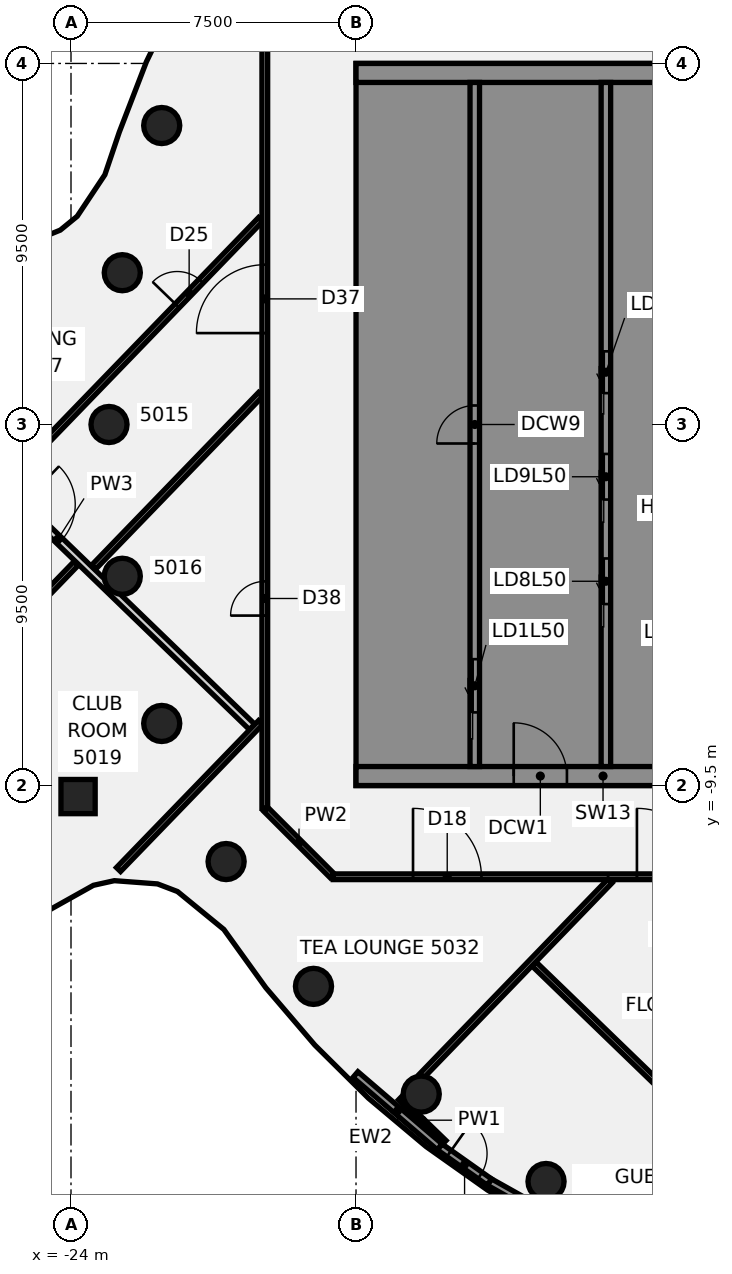
"""IFC4 building model, lengths in metres.
Left out: names, types, materials, properties, quantities, classifications, styles, units other than length and angle.
Written with IfcOpenShell. Run it as: python <this file> out.ifc"""

import sys

from ifc_helpers import new_model, si_unit, direction, frame, frame_2d, origin, origin_2d, place, context, subcontext, project, spatial, polyline, rectangle, circle, outline, extrude, element, fill, save


model = new_model("IFC4")
c1 = context("Model", 3, precision=1e-05, world=origin(), true_north=direction((0.0, 1.0)))
c2 = subcontext(c1, "Body", "Model", "MODEL_VIEW")
j1 = project(units=[si_unit("LENGTHUNIT", "METRE"), si_unit("PLANEANGLEUNIT", "RADIAN")], contexts=[c1])
p1 = place(None, origin())
s1 = spatial("IfcSite", under=j1, at=p1, CompositionType="ELEMENT")
p2 = place(p1, origin())
s2 = spatial("IfcBuilding", under=s1, at=p2, CompositionType="ELEMENT")
p3 = place(p2, frame((0.0, 0.0, 200.5)))
s3 = spatial("IfcBuildingStorey", under=s2, at=p3, CompositionType="ELEMENT", Elevation=200.5)
for number, where, z_axis, x_axis in (
    (1, (-21.613, 7.866, -0.14), (0.0, 0.0, 1.0), (1.0, 0.0, 0.0)),
    (2, (-22.651, 3.994, -0.14), (0.0, 0.0, 1.0), (1.0, 0.0, 0.0)),
    (3, (-23.0, 0.0, -0.14), (0.0, 0.0, 1.0), (1.0, 0.0, 0.0)),
    (4, (-22.651, -3.994, -0.14), (0.0, 0.0, 1.0), (1.0, 0.0, 0.0)),
    (5, (-21.613, -7.866, -0.14), (0.0, 0.0, 1.0), (1.0, 0.0, 0.0)),
    (6, (-19.919, -11.5, -0.14), (0.0, 0.0, 1.0), (1.0, 0.0, 0.0)),
    (7, (-17.619, -14.784, -0.14), (0.0, 0.0, 1.0), (1.0, 0.0, 0.0)),
    (8, (-14.784, -17.619, -0.14), (0.0, 0.0, 1.0), (1.0, 0.0, 0.0)),
    (9, (-11.5, -19.919, -0.14), (0.0, 0.0, 1.0), (1.0, 0.0, 0.0)),
):
    element("IfcColumn", number, at=place(p3, frame(where, z_axis=z_axis, x_axis=x_axis)), inside=s3, PredefinedType="COLUMN", context=c2, shape_type="SweptSolid", body=[
        extrude(circle(Radius=0.475, at=origin_2d()), origin(), (0.0, 0.0, 1.0), 3.6),
    ])
p4 = place(p3, frame((-23.814, -9.79, -0.139), z_axis=(0.049614555965, -0.008743548797, 0.998730166857), x_axis=(-0.717728105829, 0.695071309744, 0.041740154219)))
e10 = element("IfcColumn", 10, at=p4, inside=s3, PredefinedType="COLUMN", context=c2, shape_type="SweptSolid", body=[
    extrude(rectangle(XDim=0.9, YDim=0.9, at=origin_2d()), origin(), (0.0, 0.0, 1.0), 3.602),
])
p5 = place(p3, frame((-18.872, -10.128, 0.0), z_axis=(0.0, 0.0, 1.0), x_axis=(0.707106781187, -0.707106781187, 0.0)))
e11 = element("IfcWall", 11, at=p5, inside=s3, PredefinedType="PARTITIONING", context=c2, shape_type="SweptSolid", body=[
    extrude(rectangle(XDim=2.465, YDim=0.15, at=frame_2d((1.232, 0.0))), origin(), (0.0, 0.0, 1.0), 2.864),
])
p6 = place(p3, frame((-29.458, 1.924, 0.0), z_axis=(0.0, 0.0, 1.0), x_axis=(0.719015546542, -0.694993988342, 0.0)))
e12 = element("IfcWall", 12, at=p6, inside=s3, PredefinedType="PARTITIONING", context=c2, shape_type="SweptSolid", body=[
    extrude(rectangle(XDim=14.219, YDim=0.2, at=frame_2d((7.109, 0.0))), origin(), (0.0, 0.0, 1.0), 2.864),
])
p7 = place(p6, frame((5.799, 0.0, 0.0)))
e13 = element("IfcOpeningElement", 13, at=p7, cuts=e12, PredefinedType="OPENING", context=c2, shape_type="SweptSolid", body=[
    extrude(rectangle(XDim=1.4, YDim=2.1, at=frame_2d((0.7, 1.05))), frame((0.0, 0.11, 0.0), z_axis=(0.0, -1.0, 0.0), x_axis=(1.0, 0.0, 0.0)), (0.0, 0.0, 1.0), 0.22),
])
p8 = place(p3, frame((-15.348, -17.734, 0.0), z_axis=(0.0, 0.0, 1.0), x_axis=(0.718812747539, -0.695203735588, 0.0)))
e14 = element("IfcWall", 14, at=p8, inside=s3, PredefinedType="PARTITIONING", context=c2, shape_type="SweptSolid", body=[
    extrude(rectangle(XDim=1.644, YDim=0.1, at=frame_2d((0.822, 0.0))), origin(), (0.0, 0.0, 1.0), 2.864),
])
p9 = place(p3, frame((-11.815, -14.195, 0.0), z_axis=(0.0, 0.0, 1.0), x_axis=(0.718997828195, -0.695012318632, 0.0)))
e15 = element("IfcWall", 15, at=p9, inside=s3, PredefinedType="PARTITIONING", context=c2, shape_type="SweptSolid", body=[
    extrude(rectangle(XDim=17.64, YDim=0.15, at=frame_2d((8.82, 0.0))), origin(), (0.0, 0.0, 1.0), 2.864),
])
p10 = place(p9, frame((9.07, 0.0, 0.0)))
e16 = element("IfcOpeningElement", 16, at=p10, cuts=e15, PredefinedType="OPENING", context=c2, shape_type="SweptSolid", body=[
    extrude(rectangle(XDim=1.8, YDim=2.1, at=frame_2d((0.9, 1.05))), frame((0.0, 0.085, 0.0), z_axis=(0.0, -1.0, 0.0), x_axis=(1.0, 0.0, 0.0)), (0.0, 0.0, 1.0), 0.17),
])
p11 = place(p3, frame((-17.1, -11.9, 0.0), z_axis=(0.0, 0.0, 1.0), x_axis=(1.0, 0.0, 0.0)))
e17 = element("IfcWall", 17, at=p11, inside=s3, PredefinedType="PARTITIONING", context=c2, shape_type="SweptSolid", body=[
    extrude(rectangle(XDim=34.165, YDim=0.15, at=frame_2d((17.083, 0.0))), origin(), (0.0, 0.0, 1.0), 2.864),
])
p12 = place(p11, frame((7.992, 0.0, 0.0)))
e18 = element("IfcOpeningElement", 18, at=p12, cuts=e17, PredefinedType="OPENING", context=c2, shape_type="SweptSolid", body=[
    extrude(rectangle(XDim=1.8, YDim=2.1, at=frame_2d((0.9, 1.05))), frame((0.0, 0.085, 0.0), z_axis=(0.0, -1.0, 0.0), x_axis=(1.0, 0.0, 0.0)), (0.0, 0.0, 1.0), 0.17),
])
p13 = place(p11, frame((2.1, 0.0, 0.0)))
e19 = element("IfcOpeningElement", 19, at=p13, cuts=e17, PredefinedType="OPENING", context=c2, shape_type="SweptSolid", body=[
    extrude(rectangle(XDim=1.8, YDim=2.1, at=frame_2d((0.9, 1.05))), frame((0.0, 0.085, 0.0), z_axis=(0.0, -1.0, 0.0), x_axis=(1.0, 0.0, 0.0)), (0.0, 0.0, 1.0), 0.17),
])
p14 = place(p11, frame((24.937, 0.0, 0.0)))
e20 = element("IfcOpeningElement", 20, at=p14, cuts=e17, PredefinedType="OPENING", context=c2, shape_type="SweptSolid", body=[
    extrude(rectangle(XDim=1.8, YDim=2.1, at=frame_2d((0.9, 1.05))), frame((0.0, 0.085, 0.0), z_axis=(0.0, -1.0, 0.0), x_axis=(1.0, 0.0, 0.0)), (0.0, 0.0, 1.0), 0.17),
])
p15 = place(p3, frame((-29.977, -9.979, 0.0), z_axis=(0.0, 0.0, 1.0), x_axis=(0.694949427695, 0.719058615793, 0.0)))
e21 = element("IfcWall", 21, at=p15, inside=s3, PredefinedType="PARTITIONING", context=c2, shape_type="SweptSolid", body=[
    extrude(rectangle(XDim=8.8, YDim=0.15, at=frame_2d((4.4, 0.0))), origin(), (0.0, 0.0, 1.0), 2.864),
])
p16 = place(p15, frame((5.87, 0.0, 0.0)))
e22 = element("IfcOpeningElement", 22, at=p16, cuts=e21, PredefinedType="OPENING", context=c2, shape_type="SweptSolid", body=[
    extrude(rectangle(XDim=0.9, YDim=2.1, at=frame_2d((0.45, 1.05))), frame((0.0, 0.085, 0.0), z_axis=(0.0, -1.0, 0.0), x_axis=(1.0, 0.0, 0.0)), (0.0, 0.0, 1.0), 0.17),
])
p17 = place(p3, frame((-25.721, -1.548, 0.0), z_axis=(0.0, 0.0, 1.0), x_axis=(0.694993774498, 0.719015753241, 0.0)))
e23 = element("IfcWall", 23, at=p17, inside=s3, PredefinedType="PARTITIONING", context=c2, shape_type="SweptSolid", body=[
    extrude(rectangle(XDim=9.655, YDim=0.15, at=frame_2d((4.828, 0.0))), origin(), (0.0, 0.0, 1.0), 2.864),
])
p18 = place(p17, frame((6.5, 0.0, 0.0)))
e24 = element("IfcOpeningElement", 24, at=p18, cuts=e23, PredefinedType="OPENING", context=c2, shape_type="SweptSolid", body=[
    extrude(rectangle(XDim=0.9, YDim=2.1, at=frame_2d((0.45, 1.05))), frame((0.0, 0.085, 0.0), z_axis=(0.0, -1.0, 0.0), x_axis=(1.0, 0.0, 0.0)), (0.0, 0.0, 1.0), 0.17),
])
p19 = place(p3, frame((-23.408, -3.758, 0.0), z_axis=(0.0, 0.0, 1.0), x_axis=(0.69504071857, 0.718970374584, 0.0)))
e25 = element("IfcWall", 25, at=p19, inside=s3, PredefinedType="PARTITIONING", context=c2, shape_type="SweptSolid", body=[
    extrude(rectangle(XDim=6.325, YDim=0.15, at=frame_2d((3.163, 0.0))), origin(), (0.0, 0.0, 1.0), 2.864),
])
p20 = place(p3, frame((-22.75, -11.71, 0.0), z_axis=(0.0, 0.0, 1.0), x_axis=(0.695090925045, 0.718921835751, 0.0)))
e26 = element("IfcWall", 26, at=p20, inside=s3, PredefinedType="PARTITIONING", context=c2, shape_type="SweptSolid", body=[
    extrude(rectangle(XDim=5.378, YDim=0.15, at=frame_2d((2.689, 0.0))), origin(), (0.0, 0.0, 1.0), 2.864),
])
p21 = place(p3, frame((-14.771, -17.137, 0.0), z_axis=(0.0, 0.0, 1.0), x_axis=(0.695029172264, 0.718981536412, 0.0)))
e27 = element("IfcWall", 27, at=p21, inside=s3, PredefinedType="PARTITIONING", context=c2, shape_type="SweptSolid", body=[
    extrude(rectangle(XDim=7.135, YDim=0.15, at=frame_2d((3.567, 0.0))), origin(), (0.0, 0.0, 1.0), 2.864),
])
p22 = place(p3, frame((-18.9, -10.1, 0.0), z_axis=(0.0, 0.0, 1.0), x_axis=(0.0, 1.0, 0.0)))
e28 = element("IfcWall", 28, at=p22, inside=s3, PredefinedType="PARTITIONING", context=c2, shape_type="SweptSolid", body=[
    extrude(rectangle(XDim=20.2, YDim=0.15, at=frame_2d((10.1, 0.0))), origin(), (0.0, 0.0, 1.0), 2.864),
])
p23 = place(p22, frame((12.505, 0.0, 0.0)))
e29 = element("IfcOpeningElement", 29, at=p23, cuts=e28, PredefinedType="OPENING", context=c2, shape_type="SweptSolid", body=[
    extrude(rectangle(XDim=1.8, YDim=2.1, at=frame_2d((0.9, 1.05))), frame((0.0, 0.085, 0.0), z_axis=(0.0, -1.0, 0.0), x_axis=(1.0, 0.0, 0.0)), (0.0, 0.0, 1.0), 0.17),
])
p24 = place(p22, frame((5.072, 0.0, 0.0)))
e30 = element("IfcOpeningElement", 30, at=p24, cuts=e28, PredefinedType="OPENING", context=c2, shape_type="SweptSolid", body=[
    extrude(rectangle(XDim=0.9, YDim=2.1, at=frame_2d((0.45, 1.05))), frame((0.0, 0.085, 0.0), z_axis=(0.0, -1.0, 0.0), x_axis=(1.0, 0.0, 0.0)), (0.0, 0.0, 1.0), 0.17),
])
p25 = place(p3, frame((-16.516, -17.106, 0.0), z_axis=(0.0, 0.0, 1.0), x_axis=(0.758985417635, -0.651107622301, 0.0)))
e31 = element("IfcWall", 31, at=p25, inside=s3, PredefinedType="SOLIDWALL", context=c2, shape_type="SweptSolid", body=[
    extrude(rectangle(XDim=2.924, YDim=0.2, at=frame_2d((1.462, 0.0))), origin(), (0.0, 0.0, 1.0), 3.46),
])
p26 = place(p3, frame((-12.99, -19.934, 0.0), z_axis=(0.0, 0.0, 1.0), x_axis=(0.872672529234, -0.488305904859, 0.0)))
e32 = element("IfcWall", 32, at=p26, inside=s3, PredefinedType="SOLIDWALL", context=c2, shape_type="SweptSolid", body=[
    extrude(rectangle(XDim=2.924, YDim=0.2, at=frame_2d((1.462, 0.0))), origin(), (0.0, 0.0, 1.0), 3.46),
])
p27 = place(p3, frame((-14.296, -19.01, 0.0), z_axis=(0.0, 0.0, 1.0), x_axis=(0.816303315767, -0.577623490405, 0.0)))
e33 = element("IfcWall", 33, at=p27, inside=s3, PredefinedType="SOLIDWALL", context=c2, shape_type="SweptSolid", body=[
    extrude(rectangle(XDim=1.6, YDim=0.2, at=frame_2d((0.8, 0.0))), origin(), (0.0, 0.0, 1.0), 3.46),
])
p28 = place(p27, frame((0.3, 0.0, 0.0)))
e34 = element("IfcOpeningElement", 34, at=p28, cuts=e33, PredefinedType="OPENING", context=c2, shape_type="SweptSolid", body=[
    extrude(rectangle(XDim=1.0, YDim=2.4, at=frame_2d((0.5, 1.2))), frame((0.0, 0.11, 0.0), z_axis=(0.0, -1.0, 0.0), x_axis=(1.0, 0.0, 0.0)), (0.0, 0.0, 1.0), 0.22),
])
p29 = place(p3, frame((-16.5, -9.25, 0.0), z_axis=(0.0, 0.0, 1.0), x_axis=(1.0, 0.0, 0.0)))
e35 = element("IfcWall", 35, at=p29, inside=s3, PredefinedType="SHEAR", context=c2, shape_type="SweptSolid", body=[
    extrude(rectangle(XDim=13.0, YDim=0.5, at=frame_2d((6.5, 0.0))), origin(), (0.0, 0.0, 1.0), 3.46),
])
p30 = place(p29, frame((4.15, 0.0, 0.0)))
e36 = element("IfcOpeningElement", 36, at=p30, cuts=e35, PredefinedType="OPENING", context=c2, shape_type="SweptSolid", body=[
    extrude(rectangle(XDim=1.4, YDim=2.1, at=frame_2d((0.7, 1.05))), frame((0.0, 0.26, 0.0), z_axis=(0.0, -1.0, 0.0), x_axis=(1.0, 0.0, 0.0)), (0.0, 0.0, 1.0), 0.52),
])
p31 = place(p29, frame((10.125, 0.0, 0.0)))
e37 = element("IfcOpeningElement", 37, at=p31, cuts=e35, PredefinedType="OPENING", context=c2, shape_type="SweptSolid", body=[
    extrude(rectangle(XDim=1.4, YDim=2.1, at=frame_2d((0.7, 1.05))), frame((0.0, 0.26, 0.0), z_axis=(0.0, -1.0, 0.0), x_axis=(1.0, 0.0, 0.0)), (0.0, 0.0, 1.0), 0.52),
])
p32 = place(p3, origin())
e38 = element("IfcWall", 38, at=p32, inside=s3, PredefinedType="SHEAR", context=c2, shape_type="SweptSolid", body=[
    extrude(outline(polyline([(-13.5, -8.125), (-16.0, -8.125), (-16.0, -5.625), (-13.5, -5.625), (-13.5, -5.375), (-16.0, -5.375), (-16.0, 5.375), (-13.5, 5.375), (-13.5, 5.625), (-16.0, 5.625), (-16.0, 8.125), (-13.5, 8.125), (-13.5, 9.0), (-16.0, 9.0), (-16.5, 9.0), (-16.5, -9.0), (-16.0, -9.0), (-13.5, -9.0), (-13.5, -8.125)])), origin(), (0.0, 0.0, 1.0), 3.46),
])
p33 = place(p3, frame((-16.5, 9.25, 0.0), z_axis=(0.0, 0.0, 1.0), x_axis=(1.0, 0.0, 0.0)))
e39 = element("IfcWall", 39, at=p33, inside=s3, PredefinedType="SHEAR", context=c2, shape_type="SweptSolid", body=[
    extrude(rectangle(XDim=13.0, YDim=0.5, at=frame_2d((6.5, 0.0))), origin(), (0.0, 0.0, 1.0), 3.46),
])
p34 = place(p3, origin())
e40 = element("IfcWall", 40, at=p34, inside=s3, PredefinedType="SHEAR", context=c2, shape_type="SweptSolid", body=[
    extrude(outline(polyline([(-9.8, -5.375), (-9.8, -5.625), (-7.5, -5.625), (-7.25, -5.625), (-7.25, 9.0), (-7.5, 9.0), (-9.8, 9.0), (-9.8, 8.125), (-7.5, 8.125), (-7.5, 5.625), (-9.8, 5.625), (-9.8, 5.375), (-7.5, 5.375), (-7.5, 2.875), (-9.8, 2.875), (-9.8, 2.625), (-7.5, 2.625), (-7.5, 0.125), (-9.8, 0.125), (-9.8, -0.125), (-7.5, -0.125), (-7.5, -2.625), (-9.8, -2.625), (-9.8, -2.875), (-7.5, -2.875), (-7.5, -5.375), (-9.8, -5.375)])), origin(), (0.0, 0.0, 1.0), 3.46),
])
p35 = place(p3, origin())
e41 = element("IfcWall", 41, at=p35, inside=s3, PredefinedType="SHEAR", context=c2, shape_type="SweptSolid", body=[
    extrude(outline(polyline([(-7.5, -8.125), (-9.55, -8.125), (-9.55, -5.625), (-9.8, -5.625), (-9.8, -8.125), (-9.8, -9.0), (-7.5, -9.0), (-7.5, -8.125)])), origin(), (0.0, 0.0, 1.0), 3.46),
])
p36 = place(p3, frame((-13.375, -9.0, 0.0), z_axis=(0.0, 0.0, 1.0), x_axis=(0.0, 1.0, 0.0)))
e42 = element("IfcWall", 42, at=p36, inside=s3, PredefinedType="SHEAR", context=c2, shape_type="SweptSolid", body=[
    extrude(rectangle(XDim=18.0, YDim=0.25, at=frame_2d((9.0, 0.0))), origin(), (0.0, 0.0, 1.0), 3.46),
])
p37 = place(p36, frame((1.425, 0.0, 0.0)))
e43 = element("IfcOpeningElement", 43, at=p37, cuts=e42, PredefinedType="OPENING", context=c2, shape_type="SweptSolid", body=[
    extrude(rectangle(XDim=1.4, YDim=2.1, at=frame_2d((0.7, 1.05))), frame((0.0, 0.135, 0.0), z_axis=(0.0, -1.0, 0.0), x_axis=(1.0, 0.0, 0.0)), (0.0, 0.0, 1.0), 0.27),
])
p38 = place(p36, frame((8.5, 0.0, 0.0)))
e44 = element("IfcOpeningElement", 44, at=p38, cuts=e42, PredefinedType="OPENING", context=c2, shape_type="SweptSolid", body=[
    extrude(rectangle(XDim=1.0, YDim=2.1, at=frame_2d((0.5, 1.05))), frame((0.0, 0.135, 0.0), z_axis=(0.0, -1.0, 0.0), x_axis=(1.0, 0.0, 0.0)), (0.0, 0.0, 1.0), 0.27),
])
p39 = place(p3, frame((-9.925, -9.0, 0.0), z_axis=(0.0, 0.0, 1.0), x_axis=(0.0, 1.0, 0.0)))
e45 = element("IfcWall", 45, at=p39, inside=s3, PredefinedType="SHEAR", context=c2, shape_type="SweptSolid", body=[
    extrude(rectangle(XDim=18.0, YDim=0.25, at=frame_2d((9.0, 0.0))), origin(), (0.0, 0.0, 1.0), 3.46),
])
p40 = place(p39, frame((4.275, 0.0, 0.0)))
e46 = element("IfcOpeningElement", 46, at=p40, cuts=e45, PredefinedType="OPENING", context=c2, shape_type="SweptSolid", body=[
    extrude(rectangle(XDim=1.2, YDim=2.1, at=frame_2d((0.6, 1.05))), frame((0.0, 0.135, 0.0), z_axis=(0.0, -1.0, 0.0), x_axis=(1.0, 0.0, 0.0)), (0.0, 0.0, 1.0), 0.27),
])
p41 = place(p39, frame((7.025, 0.0, 0.0)))
e47 = element("IfcOpeningElement", 47, at=p41, cuts=e45, PredefinedType="OPENING", context=c2, shape_type="SweptSolid", body=[
    extrude(rectangle(XDim=1.2, YDim=2.1, at=frame_2d((0.6, 1.05))), frame((0.0, 0.135, 0.0), z_axis=(0.0, -1.0, 0.0), x_axis=(1.0, 0.0, 0.0)), (0.0, 0.0, 1.0), 0.27),
])
p42 = place(p39, frame((9.825, 0.0, 0.0)))
e48 = element("IfcOpeningElement", 48, at=p42, cuts=e45, PredefinedType="OPENING", context=c2, shape_type="SweptSolid", body=[
    extrude(rectangle(XDim=1.1, YDim=2.1, at=frame_2d((0.55, 1.05))), frame((0.0, 0.135, 0.0), z_axis=(0.0, -1.0, 0.0), x_axis=(1.0, 0.0, 0.0)), (0.0, 0.0, 1.0), 0.27),
])
p43 = place(p7, origin())
e49 = element("IfcDoor", 49, at=p43, inside=s3, OperationType="DOUBLE_DOOR_SINGLE_SWING", PredefinedType="DOOR", context=c2, shape_type="SweptSolid", body=[
    extrude(rectangle(XDim=1.4, YDim=2.1, at=frame_2d((0.7, 1.05))), frame((0.0, 0.025, 0.0), z_axis=(0.0, -1.0, 0.0), x_axis=(1.0, 0.0, 0.0)), (0.0, 0.0, 1.0), 0.05),
])
fill(e13, e49)
p44 = place(p12, origin())
e50 = element("IfcDoor", 50, at=p44, inside=s3, OperationType="DOUBLE_DOOR_SINGLE_SWING", PredefinedType="DOOR", context=c2, shape_type="SweptSolid", body=[
    extrude(rectangle(XDim=1.8, YDim=2.1, at=frame_2d((0.9, 1.05))), frame((0.0, 0.025, 0.0), z_axis=(0.0, -1.0, 0.0), x_axis=(1.0, 0.0, 0.0)), (0.0, 0.0, 1.0), 0.05),
])
fill(e18, e50)
p45 = place(p13, frame((1.8, 0.0, 0.0), z_axis=(0.0, 0.0, 1.0), x_axis=(-1.0, 0.0, 0.0)))
e51 = element("IfcDoor", 51, at=p45, inside=s3, OperationType="DOUBLE_DOOR_SINGLE_SWING", PredefinedType="DOOR", context=c2, shape_type="SweptSolid", body=[
    extrude(rectangle(XDim=1.8, YDim=2.1, at=frame_2d((0.9, 1.05))), frame((0.0, 0.025, 0.0), z_axis=(0.0, -1.0, 0.0), x_axis=(1.0, 0.0, 0.0)), (0.0, 0.0, 1.0), 0.05),
])
fill(e19, e51)
p46 = place(p18, origin())
e52 = element("IfcDoor", 52, at=p46, inside=s3, OperationType="SINGLE_SWING_LEFT", PredefinedType="DOOR", context=c2, shape_type="SweptSolid", body=[
    extrude(rectangle(XDim=0.9, YDim=2.1, at=frame_2d((0.45, 1.05))), frame((0.0, 0.025, 0.0), z_axis=(0.0, -1.0, 0.0), x_axis=(1.0, 0.0, 0.0)), (0.0, 0.0, 1.0), 0.05),
])
fill(e24, e52)
p47 = place(p23, frame((1.8, 0.0, 0.0), z_axis=(0.0, 0.0, 1.0), x_axis=(-1.0, 0.0, 0.0)))
e53 = element("IfcDoor", 53, at=p47, inside=s3, OperationType="DOUBLE_DOOR_SINGLE_SWING", PredefinedType="DOOR", context=c2, shape_type="SweptSolid", body=[
    extrude(rectangle(XDim=1.8, YDim=2.1, at=frame_2d((0.9, 1.05))), frame((0.0, 0.025, 0.0), z_axis=(0.0, -1.0, 0.0), x_axis=(1.0, 0.0, 0.0)), (0.0, 0.0, 1.0), 0.05),
])
fill(e29, e53)
p48 = place(p24, origin())
e54 = element("IfcDoor", 54, at=p48, inside=s3, OperationType="SINGLE_SWING_RIGHT", PredefinedType="DOOR", context=c2, shape_type="SweptSolid", body=[
    extrude(rectangle(XDim=0.9, YDim=2.1, at=frame_2d((0.45, 1.05))), frame((0.0, 0.025, 0.0), z_axis=(0.0, -1.0, 0.0), x_axis=(1.0, 0.0, 0.0)), (0.0, 0.0, 1.0), 0.05),
])
fill(e30, e54)
p49 = place(p28, origin())
e55 = element("IfcDoor", 55, at=p49, inside=s3, OperationType="SINGLE_SWING_LEFT", PredefinedType="DOOR", context=c2, shape_type="SweptSolid", body=[
    extrude(rectangle(XDim=1.0, YDim=2.4, at=frame_2d((0.5, 1.2))), frame((0.0, 0.025, 0.0), z_axis=(0.0, -1.0, 0.0), x_axis=(1.0, 0.0, 0.0)), (0.0, 0.0, 1.0), 0.05),
])
fill(e34, e55)
p50 = place(p30, origin())
e56 = element("IfcDoor", 56, at=p50, inside=s3, OperationType="SINGLE_SWING_LEFT", PredefinedType="DOOR", context=c2, shape_type="SweptSolid", body=[
    extrude(rectangle(XDim=1.4, YDim=2.1, at=frame_2d((0.7, 1.05))), frame((0.0, 0.025, 0.0), z_axis=(0.0, -1.0, 0.0), x_axis=(1.0, 0.0, 0.0)), (0.0, 0.0, 1.0), 0.05),
])
fill(e36, e56)
p51 = place(p37, origin())
e57 = element("IfcDoor", 57, at=p51, inside=s3, OperationType="SLIDING_TO_LEFT", PredefinedType="DOOR", context=c2, shape_type="SweptSolid", body=[
    extrude(rectangle(XDim=1.4, YDim=2.1, at=frame_2d((0.7, 1.05))), frame((0.0, 0.025, 0.0), z_axis=(0.0, -1.0, 0.0), x_axis=(1.0, 0.0, 0.0)), (0.0, 0.0, 1.0), 0.05),
])
fill(e43, e57)
p52 = place(p40, origin())
e58 = element("IfcDoor", 58, at=p52, inside=s3, OperationType="SLIDING_TO_LEFT", PredefinedType="DOOR", context=c2, shape_type="SweptSolid", body=[
    extrude(rectangle(XDim=1.2, YDim=2.1, at=frame_2d((0.6, 1.05))), frame((0.0, 0.025, 0.0), z_axis=(0.0, -1.0, 0.0), x_axis=(1.0, 0.0, 0.0)), (0.0, 0.0, 1.0), 0.05),
])
fill(e46, e58)
p53 = place(p41, origin())
e59 = element("IfcDoor", 59, at=p53, inside=s3, OperationType="SLIDING_TO_LEFT", PredefinedType="DOOR", context=c2, shape_type="SweptSolid", body=[
    extrude(rectangle(XDim=1.2, YDim=2.1, at=frame_2d((0.6, 1.05))), frame((0.0, 0.025, 0.0), z_axis=(0.0, -1.0, 0.0), x_axis=(1.0, 0.0, 0.0)), (0.0, 0.0, 1.0), 0.05),
])
fill(e47, e59)
p54 = place(p42, origin())
e60 = element("IfcDoor", 60, at=p54, inside=s3, OperationType="SLIDING_TO_LEFT", PredefinedType="DOOR", context=c2, shape_type="SweptSolid", body=[
    extrude(rectangle(XDim=1.1, YDim=2.1, at=frame_2d((0.55, 1.05))), frame((0.0, 0.025, 0.0), z_axis=(0.0, -1.0, 0.0), x_axis=(1.0, 0.0, 0.0)), (0.0, 0.0, 1.0), 0.05),
])
fill(e48, e60)
p55 = place(p38, origin())
e61 = element("IfcDoor", 61, at=p55, inside=s3, OperationType="SINGLE_SWING_LEFT", PredefinedType="DOOR", context=c2, shape_type="SweptSolid", body=[
    extrude(rectangle(XDim=1.0, YDim=2.1, at=frame_2d((0.5, 1.05))), frame((0.0, 0.025, 0.0), z_axis=(0.0, -1.0, 0.0), x_axis=(1.0, 0.0, 0.0)), (0.0, 0.0, 1.0), 0.05),
])
fill(e44, e61)
save(model, sys.argv[1])
